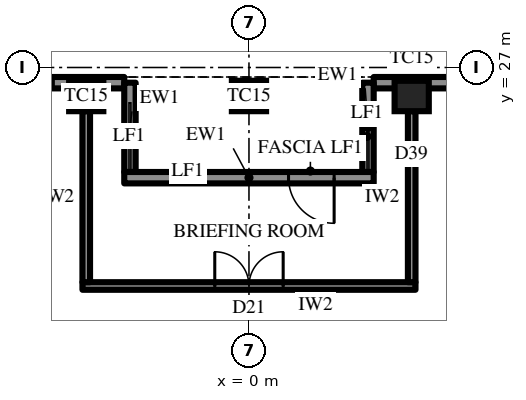
"""IFC4 building model, lengths in metres.
Left out: names, types, materials, properties, quantities, classifications, styles, units other than length and angle.
Written with IfcOpenShell. Run it as: python <this file> out.ifc"""

import sys

from ifc_helpers import new_model, si_unit, direction, frame, frame_2d, origin, origin_2d, place, context, subcontext, project, spatial, rectangle, extrude, element, fill, save


model = new_model("IFC4")
c1 = context("Model", 3, precision=1e-05, world=origin(), true_north=direction((0.0, 1.0)))
c2 = subcontext(c1, "Body", "Model", "MODEL_VIEW")
j1 = project(units=[si_unit("LENGTHUNIT", "METRE"), si_unit("PLANEANGLEUNIT", "RADIAN")], contexts=[c1])
p1 = place(None, origin())
s1 = spatial("IfcSite", under=j1, at=p1, CompositionType="ELEMENT")
p2 = place(p1, origin())
s2 = spatial("IfcBuilding", under=s1, at=p2, CompositionType="ELEMENT")
p3 = place(p2, frame((0.0, 0.0, 357.7)))
s3 = spatial("IfcBuildingStorey", under=s2, at=p3, CompositionType="ELEMENT", Elevation=357.7)
for number, where, z_axis, x_axis in (
    (1, (4.282, 26.25, 0.0), (0.0, 0.0, 1.0), (-1.0, 0.0, 0.0)),
    (2, (0.0, 26.25, 0.0), (0.0, 0.0, 1.0), (-1.0, 0.0, 0.0)),
    (3, (-4.282, 26.25, 0.0), (0.0, 0.0, 1.0), (-1.0, 0.0, 0.0)),
):
    element("IfcColumn", number, at=place(p3, frame(where, z_axis=z_axis, x_axis=x_axis)), inside=s3, PredefinedType="COLUMN", context=c2, shape_type="SweptSolid", body=[
        extrude(rectangle(XDim=0.9, YDim=0.8, at=origin_2d()), origin(), (0.0, 0.0, 1.0), 4.2),
    ])
p4 = place(p3, frame((12.846, 26.6, 0.0), z_axis=(0.0, 0.0, 1.0), x_axis=(-1.0, 0.0, 0.0)))
e4 = element("IfcWall", 4, at=p4, inside=s3, PredefinedType="SOLIDWALL", context=c2, shape_type="SweptSolid", body=[
    extrude(rectangle(XDim=9.564, YDim=0.3, at=frame_2d((4.782, 0.0))), origin(), (0.0, 0.0, 1.0), 2.9),
])
p5 = place(p4, frame((0.866, 0.0, 0.6)))
e5 = element("IfcOpeningElement", 5, at=p5, cuts=e4, PredefinedType="OPENING", context=c2, shape_type="SweptSolid", body=[
    extrude(rectangle(XDim=2.55, YDim=2.05, at=frame_2d((1.275, 1.025))), frame((0.0, 0.16, 0.0), z_axis=(0.0, -1.0, 0.0), x_axis=(1.0, 0.0, 0.0)), (0.0, 0.0, 1.0), 0.32),
])
p6 = place(p4, frame((5.823, 0.0, 0.0)))
e6 = element("IfcOpeningElement", 6, at=p6, cuts=e4, PredefinedType="OPENING", context=c2, shape_type="SweptSolid", body=[
    extrude(rectangle(XDim=1.2, YDim=2.4, at=frame_2d((0.6, 1.2))), frame((0.0, 0.16, 0.0), z_axis=(0.0, -1.0, 0.0), x_axis=(1.0, 0.0, 0.0)), (0.0, 0.0, 1.0), 0.32),
])
p7 = place(p3, frame((-3.282, 26.6, 0.0), z_axis=(0.0, 0.0, 1.0), x_axis=(-1.0, 0.0, 0.0)))
e7 = element("IfcWall", 7, at=p7, inside=s3, PredefinedType="SOLIDWALL", context=c2, shape_type="SweptSolid", body=[
    extrude(rectangle(XDim=9.564, YDim=0.3, at=frame_2d((4.782, 0.0))), origin(), (0.0, 0.0, 1.0), 2.9),
])
p8 = place(p7, frame((1.866, 0.0, 0.6)))
e8 = element("IfcOpeningElement", 8, at=p8, cuts=e7, PredefinedType="OPENING", context=c2, shape_type="SweptSolid", body=[
    extrude(rectangle(XDim=2.55, YDim=2.05, at=frame_2d((1.275, 1.025))), frame((0.0, 0.16, 0.0), z_axis=(0.0, -1.0, 0.0), x_axis=(1.0, 0.0, 0.0)), (0.0, 0.0, 1.0), 0.32),
])
p9 = place(p7, frame((6.148, 0.0, 0.6)))
e9 = element("IfcOpeningElement", 9, at=p9, cuts=e7, PredefinedType="OPENING", context=c2, shape_type="SweptSolid", body=[
    extrude(rectangle(XDim=2.55, YDim=2.05, at=frame_2d((1.275, 1.025))), frame((0.0, 0.16, 0.0), z_axis=(0.0, -1.0, 0.0), x_axis=(1.0, 0.0, 0.0)), (0.0, 0.0, 1.0), 0.32),
])
for number, where, z_axis, x_axis in (
    (10, (3.132, 26.6, 0.0), (0.0, 0.0, 1.0), (0.0, -1.0, 0.0)),
    (11, (-3.132, 26.6, 0.0), (0.0, 0.0, 1.0), (0.0, -1.0, 0.0)),
):
    element("IfcWall", number, at=place(p3, frame(where, z_axis=z_axis, x_axis=x_axis)), inside=s3, PredefinedType="SOLIDWALL", context=c2, shape_type="SweptSolid", body=[
        extrude(rectangle(XDim=2.35, YDim=0.3, at=frame_2d((1.175, 0.0))), origin(), (0.0, 0.0, 1.0), 2.9),
    ])
p10 = place(p3, frame((3.282, 24.1, 0.0), z_axis=(0.0, 0.0, 1.0), x_axis=(-1.0, 0.0, 0.0)))
e12 = element("IfcWall", 12, at=p10, inside=s3, PredefinedType="SOLIDWALL", context=c2, shape_type="SweptSolid", body=[
    extrude(rectangle(XDim=6.564, YDim=0.3, at=frame_2d((3.282, 0.0))), origin(), (0.0, 0.0, 1.0), 2.9),
])
p11 = place(p10, frame((1.041, 0.0, 0.0)))
e13 = element("IfcOpeningElement", 13, at=p11, cuts=e12, PredefinedType="OPENING", context=c2, shape_type="SweptSolid", body=[
    extrude(rectangle(XDim=1.2, YDim=2.4, at=frame_2d((0.6, 1.2))), frame((0.0, 0.16, 0.0), z_axis=(0.0, -1.0, 0.0), x_axis=(1.0, 0.0, 0.0)), (0.0, 0.0, 1.0), 0.32),
])
p12 = place(p3, frame((4.382, 21.25, 0.0), z_axis=(0.0, 0.0, 1.0), x_axis=(-1.0, 0.0, 0.0)))
e14 = element("IfcWall", 14, at=p12, inside=s3, PredefinedType="PARTITIONING", context=c2, shape_type="SweptSolid", body=[
    extrude(rectangle(XDim=8.764, YDim=0.2, at=frame_2d((4.382, 0.0))), origin(), (0.0, 0.0, 1.0), 4.0),
])
p13 = place(p12, frame((3.482, 0.0, 0.0)))
e15 = element("IfcOpeningElement", 15, at=p13, cuts=e14, PredefinedType="OPENING", context=c2, shape_type="SweptSolid", body=[
    extrude(rectangle(XDim=1.8, YDim=2.4, at=frame_2d((0.9, 1.2))), frame((0.0, 0.11, 0.0), z_axis=(0.0, -1.0, 0.0), x_axis=(1.0, 0.0, 0.0)), (0.0, 0.0, 1.0), 0.22),
])
for number, where, z_axis, x_axis in (
    (16, (4.282, 21.35, 0.0), (0.0, 0.0, 1.0), (0.0, 1.0, 0.0)),
    (17, (-4.282, 21.35, 0.0), (0.0, 0.0, 1.0), (0.0, 1.0, 0.0)),
):
    element("IfcWall", number, at=place(p3, frame(where, z_axis=z_axis, x_axis=x_axis)), inside=s3, PredefinedType="PARTITIONING", context=c2, shape_type="SweptSolid", body=[
        extrude(rectangle(XDim=4.5, YDim=0.2, at=frame_2d((2.25, 0.0))), origin(), (0.0, 0.0, 1.0), 2.992),
    ])
p14 = place(p8, origin())
e18 = element("IfcWindow", 18, at=p14, inside=s3, PartitioningType="SINGLE_PANEL", PredefinedType="WINDOW", context=c2, shape_type="SweptSolid", body=[
    extrude(rectangle(XDim=2.55, YDim=2.05, at=frame_2d((1.275, 1.025))), frame((0.0, 0.03, 0.0), z_axis=(0.0, -1.0, 0.0), x_axis=(1.0, 0.0, 0.0)), (0.0, 0.0, 1.0), 0.06),
])
fill(e8, e18)
p15 = place(p11, origin())
e19 = element("IfcDoor", 19, at=p15, inside=s3, OperationType="SINGLE_SWING_RIGHT", PredefinedType="DOOR", context=c2, shape_type="SweptSolid", body=[
    extrude(rectangle(XDim=1.2, YDim=2.4, at=frame_2d((0.6, 1.2))), frame((0.0, 0.025, 0.0), z_axis=(0.0, -1.0, 0.0), x_axis=(1.0, 0.0, 0.0)), (0.0, 0.0, 1.0), 0.05),
])
fill(e13, e19)
p16 = place(p13, frame((1.8, 0.0, 0.0), z_axis=(0.0, 0.0, 1.0), x_axis=(-1.0, 0.0, 0.0)))
e20 = element("IfcDoor", 20, at=p16, inside=s3, OperationType="DOUBLE_DOOR_SINGLE_SWING", PredefinedType="DOOR", context=c2, shape_type="SweptSolid", body=[
    extrude(rectangle(XDim=1.8, YDim=2.4, at=frame_2d((0.9, 1.2))), frame((0.0, 0.025, 0.0), z_axis=(0.0, -1.0, 0.0), x_axis=(1.0, 0.0, 0.0)), (0.0, 0.0, 1.0), 0.05),
])
fill(e15, e20)
save(model, sys.argv[1])
